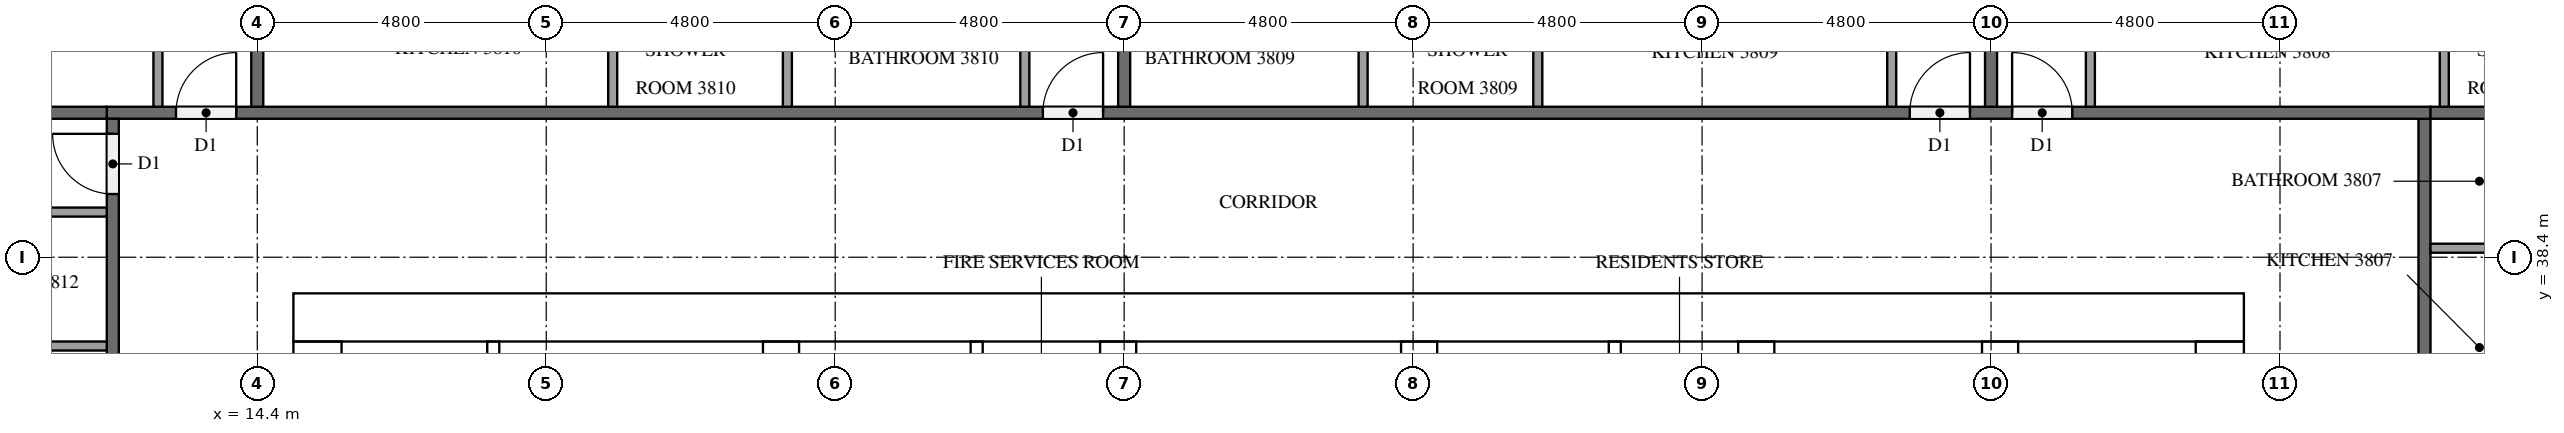
"""IFC4 building model, lengths in metres.
Left out: names, types, materials, properties, quantities, classifications, styles, units other than length and angle.
Written with IfcOpenShell. Run it as: python <this file> out.ifc"""

import sys

from ifc_helpers import new_model, si_unit, direction, frame, frame_2d, origin, place, context, subcontext, project, spatial, rectangle, extrude, element, fill, save


model = new_model("IFC4")
c1 = context("Model", 3, precision=1e-05, world=origin(), true_north=direction((0.0, 1.0)))
c2 = subcontext(c1, "Body", "Model", "MODEL_VIEW")
j1 = project(units=[si_unit("LENGTHUNIT", "METRE"), si_unit("PLANEANGLEUNIT", "RADIAN")], contexts=[c1])
p1 = place(None, origin())
s1 = spatial("IfcSite", under=j1, at=p1, CompositionType="ELEMENT")
p2 = place(p1, origin())
s2 = spatial("IfcBuilding", under=s1, at=p2, CompositionType="ELEMENT")
p3 = place(p2, frame((0.0, 0.0, 149.0)))
s3 = spatial("IfcBuildingStorey", under=s2, at=p3, CompositionType="ELEMENT", Elevation=149.0)
p4 = place(p3, frame((15.0, 37.4, 0.0), z_axis=(0.0, 0.0, 1.0), x_axis=(1.0, 0.0, 0.0)))
e1 = element("IfcWall", 1, at=p4, inside=s3, PredefinedType="SHEAR", context=c2, shape_type="SweptSolid", body=[
    extrude(rectangle(XDim=32.4, YDim=0.8, at=frame_2d((16.2, 0.0))), origin(), (0.0, 0.0, 1.0), 3.2),
])
p5 = place(p4, frame((15.3, 0.0, 0.0)))
e2 = element("IfcOpeningElement", 2, at=p5, cuts=e1, PredefinedType="OPENING", context=c2, shape_type="SweptSolid", body=[
    extrude(rectangle(XDim=1.8, YDim=2.1, at=frame_2d((0.9, 1.05))), frame((0.0, 0.41, 0.0), z_axis=(0.0, -1.0, 0.0), x_axis=(1.0, 0.0, 0.0)), (0.0, 0.0, 1.0), 0.82),
])
p6 = place(p4, frame((1.51, 0.0, 0.0)))
e3 = element("IfcOpeningElement", 3, at=p6, cuts=e1, PredefinedType="OPENING", context=c2, shape_type="SweptSolid", body=[
    extrude(rectangle(XDim=1.0, YDim=2.1, at=frame_2d((0.5, 1.05))), frame((0.0, 0.41, 0.0), z_axis=(0.0, -1.0, 0.0), x_axis=(1.0, 0.0, 0.0)), (0.0, 0.0, 1.0), 0.82),
])
p7 = place(p4, frame((5.11, 0.0, 0.0)))
e4 = element("IfcOpeningElement", 4, at=p7, cuts=e1, PredefinedType="OPENING", context=c2, shape_type="SweptSolid", body=[
    extrude(rectangle(XDim=1.0, YDim=2.1, at=frame_2d((0.5, 1.05))), frame((0.0, 0.41, 0.0), z_axis=(0.0, -1.0, 0.0), x_axis=(1.0, 0.0, 0.0)), (0.0, 0.0, 1.0), 0.82),
])
p8 = place(p3, frame((15.4, 15.8, 0.0), z_axis=(0.0, 0.0, 1.0), x_axis=(0.0, 1.0, 0.0)))
e5 = element("IfcWall", 5, at=p8, inside=s3, PredefinedType="SHEAR", context=c2, shape_type="SweptSolid", body=[
    extrude(rectangle(XDim=21.2, YDim=0.8, at=frame_2d((10.6, 0.0))), origin(), (0.0, 0.0, 1.0), 3.2),
])
p9 = place(p8, frame((4.96, 0.0, 0.0)))
e6 = element("IfcOpeningElement", 6, at=p9, cuts=e5, PredefinedType="OPENING", context=c2, shape_type="SweptSolid", body=[
    extrude(rectangle(XDim=1.2, YDim=2.1, at=frame_2d((0.6, 1.05))), frame((0.0, 0.41, 0.0), z_axis=(0.0, -1.0, 0.0), x_axis=(1.0, 0.0, 0.0)), (0.0, 0.0, 1.0), 0.82),
])
p10 = place(p3, frame((47.0, 15.8, 0.0), z_axis=(0.0, 0.0, 1.0), x_axis=(0.0, 1.0, 0.0)))
e7 = element("IfcWall", 7, at=p10, inside=s3, PredefinedType="SHEAR", context=c2, shape_type="SweptSolid", body=[
    extrude(rectangle(XDim=21.2, YDim=0.8, at=frame_2d((10.6, 0.0))), origin(), (0.0, 0.0, 1.0), 3.2),
])
p11 = place(p10, frame((10.3, 0.0, 0.0)))
e8 = element("IfcOpeningElement", 8, at=p11, cuts=e7, PredefinedType="OPENING", context=c2, shape_type="SweptSolid", body=[
    extrude(rectangle(XDim=1.2, YDim=2.1, at=frame_2d((0.6, 1.05))), frame((0.0, 0.41, 0.0), z_axis=(0.0, -1.0, 0.0), x_axis=(1.0, 0.0, 0.0)), (0.0, 0.0, 1.0), 0.82),
])
p12 = place(p3, frame((23.1, 15.8, 0.0), z_axis=(0.0, 0.0, 1.0), x_axis=(0.0, 1.0, 0.0)))
e9 = element("IfcWall", 9, at=p12, inside=s3, PredefinedType="SHEAR", context=c2, shape_type="SweptSolid", body=[
    extrude(rectangle(XDim=21.2, YDim=0.6, at=frame_2d((10.6, 0.0))), origin(), (0.0, 0.0, 1.0), 3.2),
])
p13 = place(p3, frame((39.3, 27.75, 0.0), z_axis=(0.0, 0.0, 1.0), x_axis=(0.0, 1.0, 0.0)))
e10 = element("IfcWall", 10, at=p13, inside=s3, PredefinedType="SHEAR", context=c2, shape_type="SweptSolid", body=[
    extrude(rectangle(XDim=9.25, YDim=0.6, at=frame_2d((4.625, 0.0))), origin(), (0.0, 0.0, 1.0), 3.2),
])
p14 = place(p3, frame((43.35, 27.75, 0.0), z_axis=(0.0, 0.0, 1.0), x_axis=(0.0, 1.0, 0.0)))
e11 = element("IfcWall", 11, at=p14, inside=s3, PredefinedType="SHEAR", context=c2, shape_type="SweptSolid", body=[
    extrude(rectangle(XDim=9.25, YDim=0.6, at=frame_2d((4.625, 0.0))), origin(), (0.0, 0.0, 1.0), 3.2),
])
p15 = place(p14, frame((7.65, 0.0, 0.0)))
e12 = element("IfcOpeningElement", 12, at=p15, cuts=e11, PredefinedType="OPENING", context=c2, shape_type="SweptSolid", body=[
    extrude(rectangle(XDim=1.2, YDim=2.1, at=frame_2d((0.6, 1.05))), frame((0.0, 0.31, 0.0), z_axis=(0.0, -1.0, 0.0), x_axis=(1.0, 0.0, 0.0)), (0.0, 0.0, 1.0), 0.62),
])
for number, where, z_axis, x_axis in (
    (13, (28.7, 33.85, 0.0), (0.0, 0.0, 1.0), (0.0, 1.0, 0.0)),
    (14, (33.7, 33.85, 0.0), (0.0, 0.0, 1.0), (0.0, 1.0, 0.0)),
):
    element("IfcWall", number, at=place(p3, frame(where, z_axis=z_axis, x_axis=x_axis)), inside=s3, PredefinedType="SHEAR", context=c2, shape_type="SweptSolid", body=[
        extrude(rectangle(XDim=3.15, YDim=0.6, at=frame_2d((1.575, 0.0))), origin(), (0.0, 0.0, 1.0), 3.2),
    ])
p16 = place(p3, frame((18.32, 31.55, 0.0), z_axis=(0.0, 0.0, 1.0), x_axis=(0.0, 1.0, 0.0)))
e15 = element("IfcWall", 15, at=p16, inside=s3, PredefinedType="PARTITIONING", context=c2, shape_type="SweptSolid", body=[
    extrude(rectangle(XDim=5.45, YDim=0.2, at=frame_2d((2.725, 0.0))), origin(), (0.0, 0.0, 1.0), 3.2),
])
for number, where, z_axis, x_axis in (
    (16, (26.35, 33.85, 0.0), (0.0, 0.0, 1.0), (0.0, 1.0, 0.0)),
    (17, (36.95, 33.85, 0.0), (0.0, 0.0, 1.0), (0.0, 1.0, 0.0)),
):
    element("IfcWall", number, at=place(p3, frame(where, z_axis=z_axis, x_axis=x_axis)), inside=s3, PredefinedType="PARTITIONING", context=c2, shape_type="SweptSolid", body=[
        extrude(rectangle(XDim=3.15, YDim=0.2, at=frame_2d((1.575, 0.0))), origin(), (0.0, 0.0, 1.0), 3.2),
    ])
p17 = place(p3, frame((50.4, 40.7, 0.0), z_axis=(0.0, 0.0, 1.0), x_axis=(0.0, -1.0, 0.0)))
e18 = element("IfcWall", 18, at=p17, inside=s3, PredefinedType="PARTITIONING", context=c2, shape_type="SweptSolid", body=[
    extrude(rectangle(XDim=28.6, YDim=0.2, at=frame_2d((14.3, 0.0))), origin(), (0.0, 0.0, 1.0), 3.2),
])
p18 = place(p17, frame((17.05, 0.0, 0.0)))
e19 = element("IfcOpeningElement", 19, at=p18, cuts=e18, PredefinedType="OPENING", context=c2, shape_type="SweptSolid", body=[
    extrude(rectangle(XDim=1.0, YDim=2.1, at=frame_2d((0.5, 1.05))), frame((0.0, 0.11, 0.0), z_axis=(0.0, -1.0, 0.0), x_axis=(1.0, 0.0, 0.0)), (0.0, 0.0, 1.0), 0.22),
])
p19 = place(p17, frame((15.35, 0.0, 0.0)))
e20 = element("IfcOpeningElement", 20, at=p19, cuts=e18, PredefinedType="OPENING", context=c2, shape_type="SweptSolid", body=[
    extrude(rectangle(XDim=1.0, YDim=2.1, at=frame_2d((0.5, 1.05))), frame((0.0, 0.11, 0.0), z_axis=(0.0, -1.0, 0.0), x_axis=(1.0, 0.0, 0.0)), (0.0, 0.0, 1.0), 0.22),
])
p20 = place(p17, frame((5.75, 0.0, 0.0)))
e21 = element("IfcOpeningElement", 21, at=p20, cuts=e18, PredefinedType="OPENING", context=c2, shape_type="SweptSolid", body=[
    extrude(rectangle(XDim=1.0, YDim=2.1, at=frame_2d((0.5, 1.05))), frame((0.0, 0.11, 0.0), z_axis=(0.0, -1.0, 0.0), x_axis=(1.0, 0.0, 0.0)), (0.0, 0.0, 1.0), 0.22),
])
p21 = place(p3, frame((11.9, 40.8, 0.0), z_axis=(0.0, 0.0, 1.0), x_axis=(1.0, 0.0, 0.0)))
e22 = element("IfcWall", 22, at=p21, inside=s3, PredefinedType="PARTITIONING", context=c2, shape_type="SweptSolid", body=[
    extrude(rectangle(XDim=38.6, YDim=0.2, at=frame_2d((19.3, 0.0))), origin(), (0.0, 0.0, 1.0), 3.2),
])
p22 = place(p21, frame((31.65, 0.0, 0.0)))
e23 = element("IfcOpeningElement", 23, at=p22, cuts=e22, PredefinedType="OPENING", context=c2, shape_type="SweptSolid", body=[
    extrude(rectangle(XDim=1.0, YDim=2.1, at=frame_2d((0.5, 1.05))), frame((0.0, 0.11, 0.0), z_axis=(0.0, -1.0, 0.0), x_axis=(1.0, 0.0, 0.0)), (0.0, 0.0, 1.0), 0.22),
])
p23 = place(p21, frame((29.95, 0.0, 0.0)))
e24 = element("IfcOpeningElement", 24, at=p23, cuts=e22, PredefinedType="OPENING", context=c2, shape_type="SweptSolid", body=[
    extrude(rectangle(XDim=1.0, YDim=2.1, at=frame_2d((0.5, 1.05))), frame((0.0, 0.11, 0.0), z_axis=(0.0, -1.0, 0.0), x_axis=(1.0, 0.0, 0.0)), (0.0, 0.0, 1.0), 0.22),
])
p24 = place(p21, frame((15.55, 0.0, 0.0)))
e25 = element("IfcOpeningElement", 25, at=p24, cuts=e22, PredefinedType="OPENING", context=c2, shape_type="SweptSolid", body=[
    extrude(rectangle(XDim=1.0, YDim=2.1, at=frame_2d((0.5, 1.05))), frame((0.0, 0.11, 0.0), z_axis=(0.0, -1.0, 0.0), x_axis=(1.0, 0.0, 0.0)), (0.0, 0.0, 1.0), 0.22),
])
p25 = place(p21, frame((1.15, 0.0, 0.0)))
e26 = element("IfcOpeningElement", 26, at=p25, cuts=e22, PredefinedType="OPENING", context=c2, shape_type="SweptSolid", body=[
    extrude(rectangle(XDim=1.0, YDim=2.1, at=frame_2d((0.5, 1.05))), frame((0.0, 0.11, 0.0), z_axis=(0.0, -1.0, 0.0), x_axis=(1.0, 0.0, 0.0)), (0.0, 0.0, 1.0), 0.22),
])
p26 = place(p3, frame((12.0, 12.1, 0.0), z_axis=(0.0, 0.0, 1.0), x_axis=(0.0, 1.0, 0.0)))
e27 = element("IfcWall", 27, at=p26, inside=s3, PredefinedType="PARTITIONING", context=c2, shape_type="SweptSolid", body=[
    extrude(rectangle(XDim=28.6, YDim=0.2, at=frame_2d((14.3, 0.0))), origin(), (0.0, 0.0, 1.0), 3.2),
])
p27 = place(p26, frame((27.35, 0.0, 0.0)))
e28 = element("IfcOpeningElement", 28, at=p27, cuts=e27, PredefinedType="OPENING", context=c2, shape_type="SweptSolid", body=[
    extrude(rectangle(XDim=1.0, YDim=2.1, at=frame_2d((0.5, 1.05))), frame((0.0, 0.11, 0.0), z_axis=(0.0, -1.0, 0.0), x_axis=(1.0, 0.0, 0.0)), (0.0, 0.0, 1.0), 0.22),
])
p28 = place(p26, frame((20.15, 0.0, 0.0)))
e29 = element("IfcOpeningElement", 29, at=p28, cuts=e27, PredefinedType="OPENING", context=c2, shape_type="SweptSolid", body=[
    extrude(rectangle(XDim=1.0, YDim=2.1, at=frame_2d((0.5, 1.05))), frame((0.0, 0.11, 0.0), z_axis=(0.0, -1.0, 0.0), x_axis=(1.0, 0.0, 0.0)), (0.0, 0.0, 1.0), 0.22),
])
p29 = place(p26, frame((10.55, 0.0, 0.0)))
e30 = element("IfcOpeningElement", 30, at=p29, cuts=e27, PredefinedType="OPENING", context=c2, shape_type="SweptSolid", body=[
    extrude(rectangle(XDim=1.0, YDim=2.1, at=frame_2d((0.5, 1.05))), frame((0.0, 0.11, 0.0), z_axis=(0.0, -1.0, 0.0), x_axis=(1.0, 0.0, 0.0)), (0.0, 0.0, 1.0), 0.22),
])
p30 = place(p3, frame((50.5, 40.8, 0.0), z_axis=(0.0, 0.0, 1.0), x_axis=(1.0, 0.0, 0.0)))
e31 = element("IfcWall", 31, at=p30, inside=s3, PredefinedType="PARTITIONING", context=c2, shape_type="SweptSolid", body=[
    extrude(rectangle(XDim=7.0, YDim=0.2, at=frame_2d((3.5, 0.0))), origin(), (0.0, 0.0, 1.0), 3.2),
])
p31 = place(p3, frame((43.2, 47.625, 0.0), z_axis=(0.0, 0.0, 1.0), x_axis=(0.0, -1.0, 0.0)))
e32 = element("IfcWall", 32, at=p31, inside=s3, PredefinedType="PARTITIONING", context=c2, shape_type="SweptSolid", body=[
    extrude(rectangle(XDim=6.725, YDim=0.2, at=frame_2d((3.363, 0.0))), origin(), (0.0, 0.0, 1.0), 3.2),
])
p32 = place(p3, frame((28.8, 47.9, 0.0), z_axis=(0.0, 0.0, 1.0), x_axis=(0.0, -1.0, 0.0)))
e33 = element("IfcWall", 33, at=p32, inside=s3, PredefinedType="PARTITIONING", context=c2, shape_type="SweptSolid", body=[
    extrude(rectangle(XDim=7.0, YDim=0.2, at=frame_2d((3.5, 0.0))), origin(), (0.0, 0.0, 1.0), 3.2),
])
p33 = place(p3, frame((14.4, 47.625, 0.0), z_axis=(0.0, 0.0, 1.0), x_axis=(0.0, -1.0, 0.0)))
e34 = element("IfcWall", 34, at=p33, inside=s3, PredefinedType="PARTITIONING", context=c2, shape_type="SweptSolid", body=[
    extrude(rectangle(XDim=6.725, YDim=0.2, at=frame_2d((3.363, 0.0))), origin(), (0.0, 0.0, 1.0), 3.2),
])
p34 = place(p3, frame((0.1, 40.8, 0.0), z_axis=(0.0, 0.0, 1.0), x_axis=(1.0, 0.0, 0.0)))
e35 = element("IfcWall", 35, at=p34, inside=s3, PredefinedType="PARTITIONING", context=c2, shape_type="SweptSolid", body=[
    extrude(rectangle(XDim=11.8, YDim=0.2, at=frame_2d((5.9, 0.0))), origin(), (0.0, 0.0, 1.0), 3.2),
])
p35 = place(p3, frame((50.5, 38.55, 0.0), z_axis=(0.0, 0.0, 1.0), x_axis=(1.0, 0.0, 0.0)))
e36 = element("IfcWall", 36, at=p35, inside=s3, PredefinedType="PARTITIONING", context=c2, shape_type="SweptSolid", body=[
    extrude(rectangle(XDim=1.625, YDim=0.15, at=frame_2d((0.812, 0.0))), origin(), (0.0, 0.0, 1.0), 3.2),
])
p36 = place(p3, frame((50.729, 40.9, 0.0), z_axis=(0.0, 0.0, 1.0), x_axis=(0.0, 1.0, 0.0)))
e37 = element("IfcWall", 37, at=p36, inside=s3, PredefinedType="PARTITIONING", context=c2, shape_type="SweptSolid", body=[
    extrude(rectangle(XDim=1.775, YDim=0.15, at=frame_2d((0.888, 0.0))), origin(), (0.0, 0.0, 1.0), 3.2),
])
p37 = place(p3, frame((44.85, 40.9, 0.0), z_axis=(0.0, 0.0, 1.0), x_axis=(0.0, 1.0, 0.0)))
e38 = element("IfcWall", 38, at=p37, inside=s3, PredefinedType="PARTITIONING", context=c2, shape_type="SweptSolid", body=[
    extrude(rectangle(XDim=1.925, YDim=0.15, at=frame_2d((0.962, 0.0))), origin(), (0.0, 0.0, 1.0), 3.2),
])
for number, where, z_axis, x_axis in (
    (39, (35.671, 40.9, 0.0), (0.0, 0.0, 1.0), (0.0, 1.0, 0.0)),
    (40, (32.769, 40.9, 0.0), (0.0, 0.0, 1.0), (0.0, 1.0, 0.0)),
):
    element("IfcWall", number, at=place(p3, frame(where, z_axis=z_axis, x_axis=x_axis)), inside=s3, PredefinedType="PARTITIONING", context=c2, shape_type="SweptSolid", body=[
        extrude(rectangle(XDim=1.775, YDim=0.15, at=frame_2d((0.888, 0.0))), origin(), (0.0, 0.0, 1.0), 3.2),
    ])
p38 = place(p3, frame((41.55, 40.9, 0.0), z_axis=(0.0, 0.0, 1.0), x_axis=(0.0, 1.0, 0.0)))
e41 = element("IfcWall", 41, at=p38, inside=s3, PredefinedType="PARTITIONING", context=c2, shape_type="SweptSolid", body=[
    extrude(rectangle(XDim=1.925, YDim=0.15, at=frame_2d((0.962, 0.0))), origin(), (0.0, 0.0, 1.0), 3.2),
])
for number, where, z_axis, x_axis in (
    (42, (23.206, 40.9, 0.0), (0.0, 0.0, 1.0), (0.0, 1.0, 0.0)),
    (43, (20.304, 40.9, 0.0), (0.0, 0.0, 1.0), (0.0, 1.0, 0.0)),
):
    element("IfcWall", number, at=place(p3, frame(where, z_axis=z_axis, x_axis=x_axis)), inside=s3, PredefinedType="PARTITIONING", context=c2, shape_type="SweptSolid", body=[
        extrude(rectangle(XDim=1.775, YDim=0.15, at=frame_2d((0.888, 0.0))), origin(), (0.0, 0.0, 1.0), 3.2),
    ])
p39 = place(p3, frame((27.15, 40.9, 0.0), z_axis=(0.0, 0.0, 1.0), x_axis=(0.0, 1.0, 0.0)))
e44 = element("IfcWall", 44, at=p39, inside=s3, PredefinedType="PARTITIONING", context=c2, shape_type="SweptSolid", body=[
    extrude(rectangle(XDim=1.925, YDim=0.15, at=frame_2d((0.962, 0.0))), origin(), (0.0, 0.0, 1.0), 3.2),
])
p40 = place(p3, frame((12.75, 40.9, 0.0), z_axis=(0.0, 0.0, 1.0), x_axis=(0.0, 1.0, 0.0)))
e45 = element("IfcWall", 45, at=p40, inside=s3, PredefinedType="PARTITIONING", context=c2, shape_type="SweptSolid", body=[
    extrude(rectangle(XDim=2.225, YDim=0.15, at=frame_2d((1.113, 0.0))), origin(), (0.0, 0.0, 1.0), 3.2),
])
p41 = place(p3, frame((11.9, 36.925, 0.0), z_axis=(0.0, 0.0, 1.0), x_axis=(-1.0, 0.0, 0.0)))
e46 = element("IfcWall", 46, at=p41, inside=s3, PredefinedType="PARTITIONING", context=c2, shape_type="SweptSolid", body=[
    extrude(rectangle(XDim=3.725, YDim=0.15, at=frame_2d((1.862, 0.0))), origin(), (0.0, 0.0, 1.0), 3.2),
])
p42 = place(p3, frame((11.9, 39.15, 0.0), z_axis=(0.0, 0.0, 1.0), x_axis=(-1.0, 0.0, 0.0)))
e47 = element("IfcWall", 47, at=p42, inside=s3, PredefinedType="PARTITIONING", context=c2, shape_type="SweptSolid", body=[
    extrude(rectangle(XDim=3.875, YDim=0.15, at=frame_2d((1.938, 0.0))), origin(), (0.0, 0.0, 1.0), 3.2),
])
p43 = place(p5, origin())
e48 = element("IfcDoor", 48, at=p43, inside=s3, OperationType="DOUBLE_DOOR_SINGLE_SWING", PredefinedType="DOOR", context=c2, shape_type="SweptSolid", body=[
    extrude(rectangle(XDim=1.8, YDim=2.1, at=frame_2d((0.9, 1.05))), frame((0.0, 0.025, 0.0), z_axis=(0.0, -1.0, 0.0), x_axis=(1.0, 0.0, 0.0)), (0.0, 0.0, 1.0), 0.05),
])
fill(e2, e48)
p44 = place(p6, origin())
e49 = element("IfcDoor", 49, at=p44, inside=s3, OperationType="SINGLE_SWING_LEFT", PredefinedType="DOOR", context=c2, shape_type="SweptSolid", body=[
    extrude(rectangle(XDim=1.0, YDim=2.1, at=frame_2d((0.5, 1.05))), frame((0.0, 0.025, 0.0), z_axis=(0.0, -1.0, 0.0), x_axis=(1.0, 0.0, 0.0)), (0.0, 0.0, 1.0), 0.05),
])
fill(e3, e49)
p45 = place(p7, origin())
e50 = element("IfcDoor", 50, at=p45, inside=s3, OperationType="SINGLE_SWING_RIGHT", PredefinedType="DOOR", context=c2, shape_type="SweptSolid", body=[
    extrude(rectangle(XDim=1.0, YDim=2.1, at=frame_2d((0.5, 1.05))), frame((0.0, 0.025, 0.0), z_axis=(0.0, -1.0, 0.0), x_axis=(1.0, 0.0, 0.0)), (0.0, 0.0, 1.0), 0.05),
])
fill(e4, e50)
p46 = place(p22, origin())
e51 = element("IfcDoor", 51, at=p46, inside=s3, OperationType="SINGLE_SWING_LEFT", PredefinedType="DOOR", context=c2, shape_type="SweptSolid", body=[
    extrude(rectangle(XDim=1.0, YDim=2.1, at=frame_2d((0.5, 1.05))), frame((0.0, 0.025, 0.0), z_axis=(0.0, -1.0, 0.0), x_axis=(1.0, 0.0, 0.0)), (0.0, 0.0, 1.0), 0.05),
])
fill(e23, e51)
p47 = place(p23, origin())
e52 = element("IfcDoor", 52, at=p47, inside=s3, OperationType="SINGLE_SWING_RIGHT", PredefinedType="DOOR", context=c2, shape_type="SweptSolid", body=[
    extrude(rectangle(XDim=1.0, YDim=2.1, at=frame_2d((0.5, 1.05))), frame((0.0, 0.025, 0.0), z_axis=(0.0, -1.0, 0.0), x_axis=(1.0, 0.0, 0.0)), (0.0, 0.0, 1.0), 0.05),
])
fill(e24, e52)
p48 = place(p24, origin())
e53 = element("IfcDoor", 53, at=p48, inside=s3, OperationType="SINGLE_SWING_RIGHT", PredefinedType="DOOR", context=c2, shape_type="SweptSolid", body=[
    extrude(rectangle(XDim=1.0, YDim=2.1, at=frame_2d((0.5, 1.05))), frame((0.0, 0.025, 0.0), z_axis=(0.0, -1.0, 0.0), x_axis=(1.0, 0.0, 0.0)), (0.0, 0.0, 1.0), 0.05),
])
fill(e25, e53)
p49 = place(p25, origin())
e54 = element("IfcDoor", 54, at=p49, inside=s3, OperationType="SINGLE_SWING_RIGHT", PredefinedType="DOOR", context=c2, shape_type="SweptSolid", body=[
    extrude(rectangle(XDim=1.0, YDim=2.1, at=frame_2d((0.5, 1.05))), frame((0.0, 0.025, 0.0), z_axis=(0.0, -1.0, 0.0), x_axis=(1.0, 0.0, 0.0)), (0.0, 0.0, 1.0), 0.05),
])
fill(e26, e54)
p50 = place(p27, origin())
e55 = element("IfcDoor", 55, at=p50, inside=s3, OperationType="SINGLE_SWING_RIGHT", PredefinedType="DOOR", context=c2, shape_type="SweptSolid", body=[
    extrude(rectangle(XDim=1.0, YDim=2.1, at=frame_2d((0.5, 1.05))), frame((0.0, 0.025, 0.0), z_axis=(0.0, -1.0, 0.0), x_axis=(1.0, 0.0, 0.0)), (0.0, 0.0, 1.0), 0.05),
])
fill(e28, e55)
save(model, sys.argv[1])
